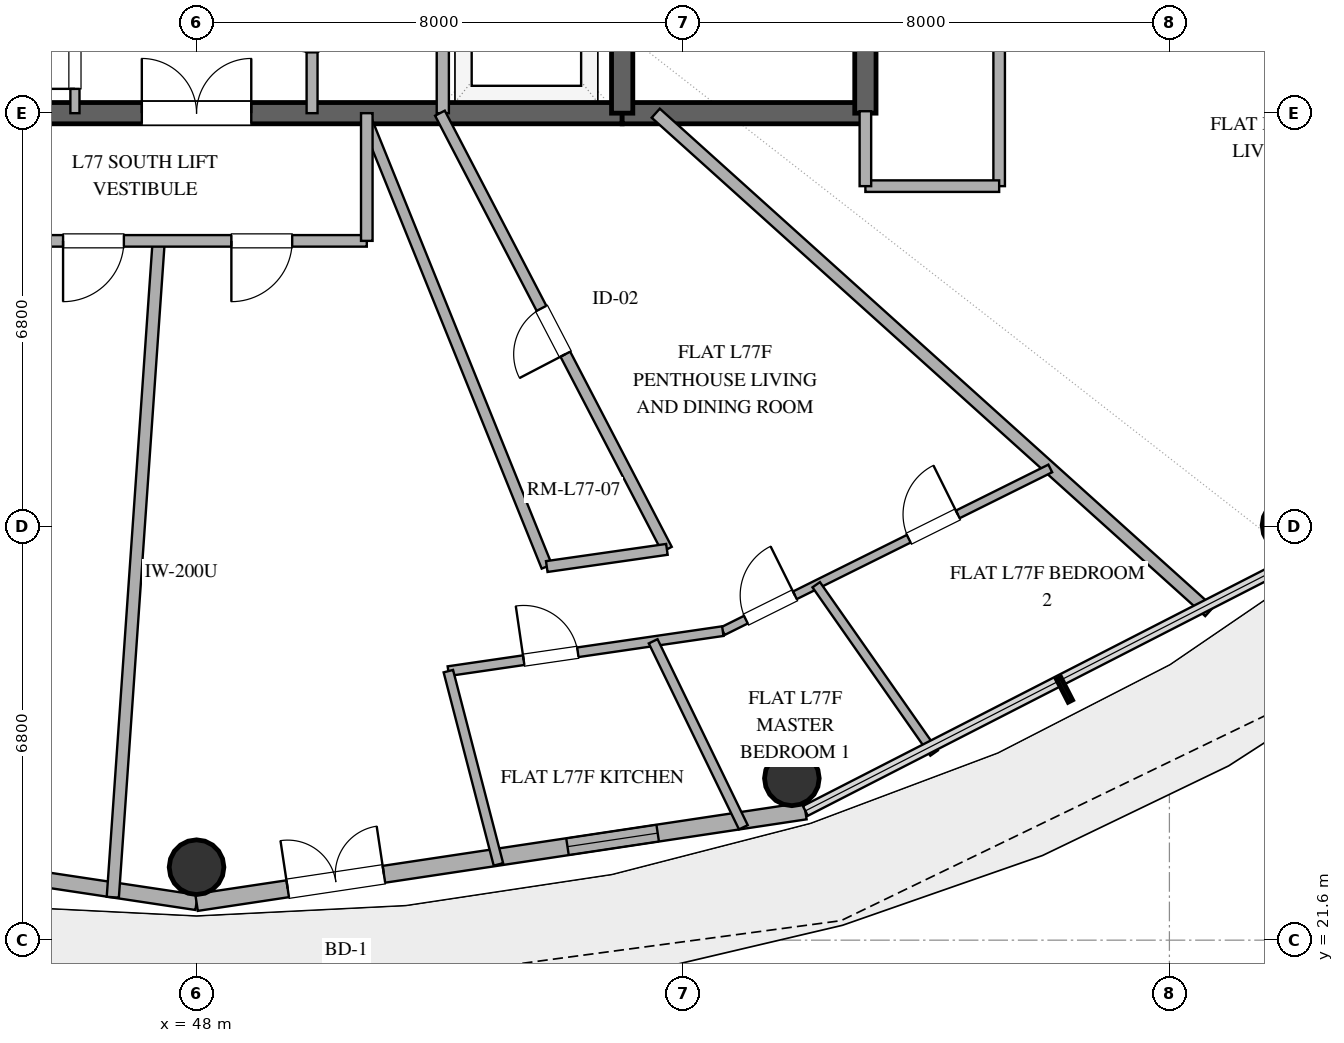
"""IFC4 building model, lengths in metres.
Left out: names, types, materials, properties, quantities, classifications, styles, units other than length and angle.
Written with IfcOpenShell. Run it as: python <this file> out.ifc"""

import sys

from ifc_helpers import new_model, si_unit, direction, frame, frame_2d, origin, origin_2d, place, context, subcontext, project, spatial, rectangle, hollow_circle, extrude, element, fill, save


model = new_model("IFC4")
c1 = context("Model", 3, precision=1e-05, world=origin(), true_north=direction((0.0, 1.0)))
c2 = subcontext(c1, "Body", "Model", "MODEL_VIEW")
j1 = project(units=[si_unit("LENGTHUNIT", "METRE"), si_unit("PLANEANGLEUNIT", "RADIAN")], contexts=[c1])
p1 = place(None, origin())
s1 = spatial("IfcSite", under=j1, at=p1, CompositionType="ELEMENT")
p2 = place(p1, origin())
s2 = spatial("IfcBuilding", under=s1, at=p2, CompositionType="ELEMENT")
p3 = place(p2, frame((0.0, 0.0, 298.2)))
s3 = spatial("IfcBuildingStorey", under=s2, at=p3, CompositionType="ELEMENT", Elevation=298.2)
p4 = place(p3, frame((41.0, 35.2, 0.0), z_axis=(0.0, 0.0, 1.0), x_axis=(1.0, 0.0, 0.0)))
e1 = element("IfcWall", 1, at=p4, inside=s3, PredefinedType="SHEAR", context=c2, shape_type="SweptSolid", body=[
    extrude(rectangle(XDim=14.0, YDim=0.35, at=frame_2d((7.0, 0.0))), origin(), (0.0, 0.0, 1.0), 3.37),
])
p5 = place(p4, frame((6.1, 0.0, 0.0)))
e2 = element("IfcOpeningElement", 2, at=p5, cuts=e1, PredefinedType="OPENING", context=c2, shape_type="SweptSolid", body=[
    extrude(rectangle(XDim=1.8, YDim=2.25, at=frame_2d((0.9, 1.125))), frame((0.0, 0.185, 0.0), z_axis=(0.0, -1.0, 0.0), x_axis=(1.0, 0.0, 0.0)), (0.0, 0.0, 1.0), 0.37),
])
p6 = place(p3, frame((55.0, 35.2, 0.0), z_axis=(0.0, 0.0, 1.0), x_axis=(1.0, 0.0, 0.0)))
e3 = element("IfcWall", 3, at=p6, inside=s3, PredefinedType="SHEAR", context=c2, shape_type="SweptSolid", body=[
    extrude(rectangle(XDim=4.0, YDim=0.35, at=frame_2d((2.0, 0.0))), origin(), (0.0, 0.0, 1.0), 3.37),
])
p7 = place(p3, frame((59.0, 35.2, 0.0), z_axis=(0.0, 0.0, 1.0), x_axis=(0.0, 1.0, 0.0)))
e4 = element("IfcWall", 4, at=p7, inside=s3, PredefinedType="SHEAR", context=c2, shape_type="SweptSolid", body=[
    extrude(rectangle(XDim=13.6, YDim=0.35, at=frame_2d((6.8, 0.0))), origin(), (0.0, 0.0, 1.0), 3.37),
])
p8 = place(p7, frame((1.5, 0.0, 0.0)))
e5 = element("IfcOpeningElement", 5, at=p8, cuts=e4, PredefinedType="OPENING", context=c2, shape_type="SweptSolid", body=[
    extrude(rectangle(XDim=1.2, YDim=2.15, at=frame_2d((0.6, 1.075))), frame((0.0, 0.185, 0.0), z_axis=(0.0, -1.0, 0.0), x_axis=(1.0, 0.0, 0.0)), (0.0, 0.0, 1.0), 0.37),
])
p9 = place(p3, frame((55.0, 35.2, 0.0), z_axis=(0.0, 0.0, 1.0), x_axis=(0.0, 1.0, 0.0)))
e6 = element("IfcWall", 6, at=p9, inside=s3, PredefinedType="SHEAR", context=c2, shape_type="SweptSolid", body=[
    extrude(rectangle(XDim=13.6, YDim=0.35, at=frame_2d((6.8, 0.0))), origin(), (0.0, 0.0, 1.0), 3.37),
])
p10 = place(p9, frame((1.15, 0.0, 0.0)))
e7 = element("IfcOpeningElement", 7, at=p10, cuts=e6, PredefinedType="OPENING", context=c2, shape_type="SweptSolid", body=[
    extrude(rectangle(XDim=1.1, YDim=2.2, at=frame_2d((0.55, 1.1))), frame((0.0, 0.185, 0.0), z_axis=(0.0, -1.0, 0.0), x_axis=(1.0, 0.0, 0.0)), (0.0, 0.0, 1.0), 0.37),
])
for number, where, z_axis, x_axis in (
    (8, (48.0, 22.8, 0.0), (0.0, 0.0, 1.0), (1.0, 0.0, 0.0)),
    (9, (57.791, 24.261, 0.0), (0.0, 0.0, 1.0), (1.0, 0.0, 0.0)),
    (10, (65.975, 28.424, 0.0), (0.0, 0.0, 1.0), (1.0, 0.0, 0.0)),
):
    element("IfcColumn", number, at=place(p3, frame(where, z_axis=z_axis, x_axis=x_axis)), inside=s3, PredefinedType="COLUMN", context=c2, shape_type="SweptSolid", body=[
        extrude(hollow_circle(Radius=0.45, WallThickness=0.025, at=origin_2d()), origin(), (0.0, 0.0, 1.0), 3.37),
    ])
p11 = place(p3, frame((37.987, 23.726, 0.0), z_axis=(0.0, 0.0, 1.0), x_axis=(0.988882522213, -0.148698881169, 0.0)))
e11 = element("IfcWall", 11, at=p11, inside=s3, PredefinedType="SOLIDWALL", context=c2, shape_type="SweptSolid", body=[
    extrude(rectangle(XDim=10.125, YDim=0.25, at=frame_2d((5.062, 0.0))), origin(), (0.0, 0.0, 1.0), 3.37),
])
p12 = place(p3, frame((48.0, 22.22, 0.0), z_axis=(0.0, 0.0, 1.0), x_axis=(0.988882522213, 0.148698881169, 0.0)))
e12 = element("IfcWall", 12, at=p12, inside=s3, PredefinedType="SOLIDWALL", context=c2, shape_type="SweptSolid", body=[
    extrude(rectangle(XDim=10.125, YDim=0.28, at=frame_2d((5.062, 0.0))), origin(), (0.0, 0.0, 1.0), 3.37),
])
p13 = place(p12, frame((1.516, 0.0, 0.0)))
e13 = element("IfcOpeningElement", 13, at=p13, cuts=e12, PredefinedType="OPENING", context=c2, shape_type="SweptSolid", body=[
    extrude(rectangle(XDim=1.6, YDim=2.25, at=frame_2d((0.8, 1.125))), frame((0.0, 0.15, 0.0), z_axis=(0.0, -1.0, 0.0), x_axis=(1.0, 0.0, 0.0)), (0.0, 0.0, 1.0), 0.3),
])
p14 = place(p12, frame((6.169, 0.0, 0.85)))
e14 = element("IfcOpeningElement", 14, at=p14, cuts=e12, PredefinedType="OPENING", context=c2, shape_type="SweptSolid", body=[
    extrude(rectangle(XDim=1.5, YDim=2.0, at=frame_2d((0.75, 1.0))), frame((0.0, 0.15, 0.0), z_axis=(0.0, -1.0, 0.0), x_axis=(1.0, 0.0, 0.0)), (0.0, 0.0, 1.0), 0.3),
])
p15 = place(p3, frame((52.05, 35.2, 0.0), z_axis=(0.0, 0.0, 1.0), x_axis=(0.0, 1.0, 0.0)))
e15 = element("IfcWall", 15, at=p15, inside=s3, PredefinedType="SOLIDWALL", context=c2, shape_type="SweptSolid", body=[
    extrude(rectangle(XDim=3.2, YDim=0.2, at=frame_2d((1.6, 0.0))), origin(), (0.0, 0.0, 1.0), 2.73),
])
p16 = place(p3, frame((46.0, 35.2, 0.0), z_axis=(0.0, 0.0, 1.0), x_axis=(0.0, 1.0, 0.0)))
e16 = element("IfcWall", 16, at=p16, inside=s3, PredefinedType="PARTITIONING", context=c2, shape_type="SweptSolid", body=[
    extrude(rectangle(XDim=3.2, YDim=0.15, at=frame_2d((1.6, 0.0))), origin(), (0.0, 0.0, 1.0), 2.73),
])
p17 = place(p16, frame((0.4, 0.0, 0.0)))
e17 = element("IfcOpeningElement", 17, at=p17, cuts=e16, PredefinedType="OPENING", context=c2, shape_type="SweptSolid", body=[
    extrude(rectangle(XDim=0.85, YDim=2.15, at=frame_2d((0.425, 1.075))), frame((0.0, 0.085, 0.0), z_axis=(0.0, -1.0, 0.0), x_axis=(1.0, 0.0, 0.0)), (0.0, 0.0, 1.0), 0.17),
])
p18 = place(p16, frame((1.85, 0.0, 0.0)))
e18 = element("IfcOpeningElement", 18, at=p18, cuts=e16, PredefinedType="OPENING", context=c2, shape_type="SweptSolid", body=[
    extrude(rectangle(XDim=0.85, YDim=2.15, at=frame_2d((0.425, 1.075))), frame((0.0, 0.085, 0.0), z_axis=(0.0, -1.0, 0.0), x_axis=(1.0, 0.0, 0.0)), (0.0, 0.0, 1.0), 0.17),
])
p19 = place(p3, frame((49.9, 35.2, 0.0), z_axis=(0.0, 0.0, 1.0), x_axis=(0.0, 1.0, 0.0)))
e19 = element("IfcWall", 19, at=p19, inside=s3, PredefinedType="PLUMBINGWALL", context=c2, shape_type="SweptSolid", body=[
    extrude(rectangle(XDim=3.0, YDim=0.18, at=frame_2d((1.5, 0.0))), origin(), (0.0, 0.0, 1.0), 2.73),
])
p20 = place(p19, frame((1.0, 0.0, 0.0)))
e20 = element("IfcOpeningElement", 20, at=p20, cuts=e19, PredefinedType="OPENING", context=c2, shape_type="SweptSolid", body=[
    extrude(rectangle(XDim=0.9, YDim=2.1, at=frame_2d((0.45, 1.05))), frame((0.0, 0.1, 0.0), z_axis=(0.0, -1.0, 0.0), x_axis=(1.0, 0.0, 0.0)), (0.0, 0.0, 1.0), 0.2),
])
p21 = place(p3, frame((47.378, 33.1, 0.0), z_axis=(0.0, 0.0, 1.0), x_axis=(-0.069765360577, -0.997563428792, 0.0)))
e21 = element("IfcWall", 21, at=p21, inside=s3, PredefinedType="PARTITIONING", context=c2, shape_type="SweptSolid", body=[
    extrude(rectangle(XDim=10.82, YDim=0.2, at=frame_2d((5.41, 0.0))), origin(), (0.0, 0.0, 1.0), 2.73),
])
p22 = place(p3, frame((64.656, 27.003, 0.0), z_axis=(0.0, 0.0, 1.0), x_axis=(-0.743146474593, 0.669128774826, 0.0)))
e22 = element("IfcWall", 22, at=p22, inside=s3, PredefinedType="PARTITIONING", context=c2, shape_type="SweptSolid", body=[
    extrude(rectangle(XDim=12.25, YDim=0.2, at=frame_2d((6.125, 0.0))), origin(), (0.0, 0.0, 1.0), 2.73),
])
p23 = place(p3, frame((55.736, 28.027, 0.0), z_axis=(0.0, 0.0, 1.0), x_axis=(-0.461598928477, 0.88708873808, 0.0)))
e23 = element("IfcWall", 23, at=p23, inside=s3, PredefinedType="PLUMBINGWALL", context=c2, shape_type="SweptSolid", body=[
    extrude(rectangle(XDim=8.086, YDim=0.18, at=frame_2d((4.043, 0.0))), origin(), (0.0, 0.0, 1.0), 2.73),
])
p24 = place(p23, frame((3.618, 0.0, 0.0)))
e24 = element("IfcOpeningElement", 24, at=p24, cuts=e23, PredefinedType="OPENING", context=c2, shape_type="SweptSolid", body=[
    extrude(rectangle(XDim=0.85, YDim=2.1, at=frame_2d((0.425, 1.05))), frame((0.0, 0.1, 0.0), z_axis=(0.0, -1.0, 0.0), x_axis=(1.0, 0.0, 0.0)), (0.0, 0.0, 1.0), 0.2),
])
p25 = place(p3, frame((50.8, 35.07, 0.0), z_axis=(0.0, 0.0, 1.0), x_axis=(0.374600990238, -0.927186118378, 0.0)))
e25 = element("IfcWall", 25, at=p25, inside=s3, PredefinedType="PLUMBINGWALL", context=c2, shape_type="SweptSolid", body=[
    extrude(rectangle(XDim=7.901, YDim=0.18, at=frame_2d((3.95, 0.0))), origin(), (0.0, 0.0, 1.0), 2.73),
])
p26 = place(p3, frame((61.2, 45.252, 0.0), z_axis=(0.0, 0.0, 1.0), x_axis=(0.0, -1.0, 0.0)))
e26 = element("IfcWall", 26, at=p26, inside=s3, PredefinedType="PARTITIONING", context=c2, shape_type="SweptSolid", body=[
    extrude(rectangle(XDim=11.252, YDim=0.19, at=frame_2d((5.626, 0.0))), origin(), (0.0, 0.0, 1.0), 2.73),
])
p27 = place(p26, frame((7.871, 0.0, 0.0)))
e27 = element("IfcOpeningElement", 27, at=p27, cuts=e26, PredefinedType="OPENING", context=c2, shape_type="SweptSolid", body=[
    extrude(rectangle(XDim=1.0, YDim=2.2, at=frame_2d((0.5, 1.1))), frame((0.0, 0.105, 0.0), z_axis=(0.0, -1.0, 0.0), x_axis=(1.0, 0.0, 0.0)), (0.0, 0.0, 1.0), 0.21),
])
p28 = place(p3, frame((56.655, 26.682, 0.0), z_axis=(0.0, 0.0, 1.0), x_axis=(0.895585218268, 0.444890005304, 0.0)))
e28 = element("IfcWall", 28, at=p28, inside=s3, PredefinedType="PARTITIONING", context=c2, shape_type="SweptSolid", body=[
    extrude(rectangle(XDim=6.014, YDim=0.14, at=frame_2d((3.007, 0.0))), origin(), (0.0, 0.0, 1.0), 2.73),
])
p29 = place(p28, frame((3.415, 0.0, 0.0)))
e29 = element("IfcOpeningElement", 29, at=p29, cuts=e28, PredefinedType="OPENING", context=c2, shape_type="SweptSolid", body=[
    extrude(rectangle(XDim=0.9, YDim=2.1, at=frame_2d((0.45, 1.05))), frame((0.0, 0.08, 0.0), z_axis=(0.0, -1.0, 0.0), x_axis=(1.0, 0.0, 0.0)), (0.0, 0.0, 1.0), 0.16),
])
p30 = place(p28, frame((0.424, 0.0, 0.0)))
e30 = element("IfcOpeningElement", 30, at=p30, cuts=e28, PredefinedType="OPENING", context=c2, shape_type="SweptSolid", body=[
    extrude(rectangle(XDim=0.9, YDim=2.1, at=frame_2d((0.45, 1.05))), frame((0.0, 0.08, 0.0), z_axis=(0.0, -1.0, 0.0), x_axis=(1.0, 0.0, 0.0)), (0.0, 0.0, 1.0), 0.16),
])
p31 = place(p3, frame((50.8, 33.1, 0.0), z_axis=(0.0, 0.0, 1.0), x_axis=(-1.0, 0.0, 0.0)))
e31 = element("IfcWall", 31, at=p31, inside=s3, PredefinedType="PARTITIONING", context=c2, shape_type="SweptSolid", body=[
    extrude(rectangle(XDim=5.6, YDim=0.19, at=frame_2d((2.8, 0.0))), origin(), (0.0, 0.0, 1.0), 2.73),
])
p32 = place(p31, frame((1.227, 0.0, 0.0)))
e32 = element("IfcOpeningElement", 32, at=p32, cuts=e31, PredefinedType="OPENING", context=c2, shape_type="SweptSolid", body=[
    extrude(rectangle(XDim=1.0, YDim=2.2, at=frame_2d((0.5, 1.1))), frame((0.0, 0.105, 0.0), z_axis=(0.0, -1.0, 0.0), x_axis=(1.0, 0.0, 0.0)), (0.0, 0.0, 1.0), 0.21),
])
p33 = place(p31, frame((3.995, 0.0, 0.0)))
e33 = element("IfcOpeningElement", 33, at=p33, cuts=e31, PredefinedType="OPENING", context=c2, shape_type="SweptSolid", body=[
    extrude(rectangle(XDim=1.0, YDim=2.2, at=frame_2d((0.5, 1.1))), frame((0.0, 0.105, 0.0), z_axis=(0.0, -1.0, 0.0), x_axis=(1.0, 0.0, 0.0)), (0.0, 0.0, 1.0), 0.21),
])
p34 = place(p3, frame((52.141, 26.024, 0.0), z_axis=(0.0, 0.0, 1.0), x_axis=(0.989534254842, 0.144298158322, 0.0)))
e34 = element("IfcWall", 34, at=p34, inside=s3, PredefinedType="PLUMBINGWALL", context=c2, shape_type="SweptSolid", body=[
    extrude(rectangle(XDim=4.562, YDim=0.16, at=frame_2d((2.281, 0.0))), origin(), (0.0, 0.0, 1.0), 2.73),
])
p35 = place(p34, frame((1.252, 0.0, 0.0)))
e35 = element("IfcOpeningElement", 35, at=p35, cuts=e34, PredefinedType="OPENING", context=c2, shape_type="SweptSolid", body=[
    extrude(rectangle(XDim=0.9, YDim=2.1, at=frame_2d((0.45, 1.05))), frame((0.0, 0.09, 0.0), z_axis=(0.0, -1.0, 0.0), x_axis=(1.0, 0.0, 0.0)), (0.0, 0.0, 1.0), 0.18),
])
p36 = place(p3, frame((55.51, 26.515, 0.0), z_axis=(0.0, 0.0, 1.0), x_axis=(0.436379231312, -0.899762839019, 0.0)))
e36 = element("IfcWall", 36, at=p36, inside=s3, PredefinedType="PLUMBINGWALL", context=c2, shape_type="SweptSolid", body=[
    extrude(rectangle(XDim=3.399, YDim=0.16, at=frame_2d((1.7, 0.0))), origin(), (0.0, 0.0, 1.0), 2.73),
])
p37 = place(p3, frame((58.191, 27.445, 0.0), z_axis=(0.0, 0.0, 1.0), x_axis=(0.573559302344, -0.819164041383, 0.0)))
e37 = element("IfcWall", 37, at=p37, inside=s3, PredefinedType="PARTITIONING", context=c2, shape_type="SweptSolid", body=[
    extrude(rectangle(XDim=3.38, YDim=0.15, at=frame_2d((1.69, 0.0))), origin(), (0.0, 0.0, 1.0), 2.73),
])
p38 = place(p3, frame((52.965, 22.846, 0.0), z_axis=(0.0, 0.0, 1.0), x_axis=(-0.250907961693, 0.968010947644, 0.0)))
e38 = element("IfcWall", 38, at=p38, inside=s3, PredefinedType="PLUMBINGWALL", context=c2, shape_type="SweptSolid", body=[
    extrude(rectangle(XDim=3.283, YDim=0.16, at=frame_2d((1.642, 0.0))), origin(), (0.0, 0.0, 1.0), 2.73),
])
p39 = place(p3, frame((61.2, 34.0, 0.0), z_axis=(0.0, 0.0, 1.0), x_axis=(-1.0, 0.0, 0.0)))
e39 = element("IfcWall", 39, at=p39, inside=s3, PredefinedType="PARTITIONING", context=c2, shape_type="SweptSolid", body=[
    extrude(rectangle(XDim=2.2, YDim=0.19, at=frame_2d((1.1, 0.0))), origin(), (0.0, 0.0, 1.0), 2.73),
])
p40 = place(p3, frame((50.8, 35.2, 0.0), z_axis=(0.0, 0.0, 1.0), x_axis=(0.0, -1.0, 0.0)))
e40 = element("IfcWall", 40, at=p40, inside=s3, PredefinedType="PARTITIONING", context=c2, shape_type="SweptSolid", body=[
    extrude(rectangle(XDim=2.1, YDim=0.19, at=frame_2d((1.05, 0.0))), origin(), (0.0, 0.0, 1.0), 2.73),
])
p41 = place(p3, frame((53.76, 27.744, 0.0), z_axis=(0.0, 0.0, 1.0), x_axis=(0.989917666011, 0.141643970992, 0.0)))
e41 = element("IfcWall", 41, at=p41, inside=s3, PredefinedType="PLUMBINGWALL", context=c2, shape_type="SweptSolid", body=[
    extrude(rectangle(XDim=1.996, YDim=0.18, at=frame_2d((0.998, 0.0))), origin(), (0.0, 0.0, 1.0), 2.73),
])
p42 = place(p3, frame((59.0, 34.0, 0.0), z_axis=(0.0, 0.0, 1.0), x_axis=(0.0, 1.0, 0.0)))
e42 = element("IfcWall", 42, at=p42, inside=s3, PredefinedType="PARTITIONING", context=c2, shape_type="SweptSolid", body=[
    extrude(rectangle(XDim=1.232, YDim=0.19, at=frame_2d((0.616, 0.0))), origin(), (0.0, 0.0, 1.0), 2.73),
])
p43 = place(p13, origin())
e43 = element("IfcDoor", 43, at=p43, inside=s3, OperationType="DOUBLE_DOOR_SINGLE_SWING", PredefinedType="DOOR", context=c2, shape_type="SweptSolid", body=[
    extrude(rectangle(XDim=1.6, YDim=2.25, at=frame_2d((0.8, 1.125))), frame((0.0, 0.025, 0.0), z_axis=(0.0, -1.0, 0.0), x_axis=(1.0, 0.0, 0.0)), (0.0, 0.0, 1.0), 0.05),
])
fill(e13, e43)
p44 = place(p14, origin())
e44 = element("IfcWindow", 44, at=p44, inside=s3, PartitioningType="SINGLE_PANEL", PredefinedType="WINDOW", context=c2, shape_type="SweptSolid", body=[
    extrude(rectangle(XDim=1.5, YDim=2.0, at=frame_2d((0.75, 1.0))), frame((0.0, 0.03, 0.0), z_axis=(0.0, -1.0, 0.0), x_axis=(1.0, 0.0, 0.0)), (0.0, 0.0, 1.0), 0.06),
])
fill(e14, e44)
p45 = place(p5, origin())
e45 = element("IfcDoor", 45, at=p45, inside=s3, OperationType="DOUBLE_DOOR_SINGLE_SWING", PredefinedType="DOOR", context=c2, shape_type="SweptSolid", body=[
    extrude(rectangle(XDim=1.8, YDim=2.25, at=frame_2d((0.9, 1.125))), frame((0.0, 0.025, 0.0), z_axis=(0.0, -1.0, 0.0), x_axis=(1.0, 0.0, 0.0)), (0.0, 0.0, 1.0), 0.05),
])
fill(e2, e45)
p46 = place(p17, origin())
e46 = element("IfcDoor", 46, at=p46, inside=s3, OperationType="SINGLE_SWING_LEFT", PredefinedType="DOOR", context=c2, shape_type="SweptSolid", body=[
    extrude(rectangle(XDim=0.85, YDim=2.15, at=frame_2d((0.425, 1.075))), frame((0.0, 0.025, 0.0), z_axis=(0.0, -1.0, 0.0), x_axis=(1.0, 0.0, 0.0)), (0.0, 0.0, 1.0), 0.05),
])
fill(e17, e46)
p47 = place(p24, origin())
e47 = element("IfcDoor", 47, at=p47, inside=s3, OperationType="SINGLE_SWING_LEFT", PredefinedType="DOOR", context=c2, shape_type="SweptSolid", body=[
    extrude(rectangle(XDim=0.85, YDim=2.1, at=frame_2d((0.425, 1.05))), frame((0.0, 0.025, 0.0), z_axis=(0.0, -1.0, 0.0), x_axis=(1.0, 0.0, 0.0)), (0.0, 0.0, 1.0), 0.05),
])
fill(e24, e47)
p48 = place(p29, origin())
e48 = element("IfcDoor", 48, at=p48, inside=s3, OperationType="SINGLE_SWING_RIGHT", PredefinedType="DOOR", context=c2, shape_type="SweptSolid", body=[
    extrude(rectangle(XDim=0.9, YDim=2.1, at=frame_2d((0.45, 1.05))), frame((0.0, 0.025, 0.0), z_axis=(0.0, -1.0, 0.0), x_axis=(1.0, 0.0, 0.0)), (0.0, 0.0, 1.0), 0.05),
])
fill(e29, e48)
p49 = place(p30, origin())
e49 = element("IfcDoor", 49, at=p49, inside=s3, OperationType="SINGLE_SWING_RIGHT", PredefinedType="DOOR", context=c2, shape_type="SweptSolid", body=[
    extrude(rectangle(XDim=0.9, YDim=2.1, at=frame_2d((0.45, 1.05))), frame((0.0, 0.025, 0.0), z_axis=(0.0, -1.0, 0.0), x_axis=(1.0, 0.0, 0.0)), (0.0, 0.0, 1.0), 0.05),
])
fill(e30, e49)
p50 = place(p32, origin())
e50 = element("IfcDoor", 50, at=p50, inside=s3, OperationType="SINGLE_SWING_RIGHT", PredefinedType="DOOR", context=c2, shape_type="SweptSolid", body=[
    extrude(rectangle(XDim=1.0, YDim=2.2, at=frame_2d((0.5, 1.1))), frame((0.0, 0.025, 0.0), z_axis=(0.0, -1.0, 0.0), x_axis=(1.0, 0.0, 0.0)), (0.0, 0.0, 1.0), 0.05),
])
fill(e32, e50)
p51 = place(p33, origin())
e51 = element("IfcDoor", 51, at=p51, inside=s3, OperationType="SINGLE_SWING_RIGHT", PredefinedType="DOOR", context=c2, shape_type="SweptSolid", body=[
    extrude(rectangle(XDim=1.0, YDim=2.2, at=frame_2d((0.5, 1.1))), frame((0.0, 0.025, 0.0), z_axis=(0.0, -1.0, 0.0), x_axis=(1.0, 0.0, 0.0)), (0.0, 0.0, 1.0), 0.05),
])
fill(e33, e51)
p52 = place(p35, origin())
e52 = element("IfcDoor", 52, at=p52, inside=s3, OperationType="SINGLE_SWING_LEFT", PredefinedType="DOOR", context=c2, shape_type="SweptSolid", body=[
    extrude(rectangle(XDim=0.9, YDim=2.1, at=frame_2d((0.45, 1.05))), frame((0.0, 0.025, 0.0), z_axis=(0.0, -1.0, 0.0), x_axis=(1.0, 0.0, 0.0)), (0.0, 0.0, 1.0), 0.05),
])
fill(e35, e52)
save(model, sys.argv[1])
